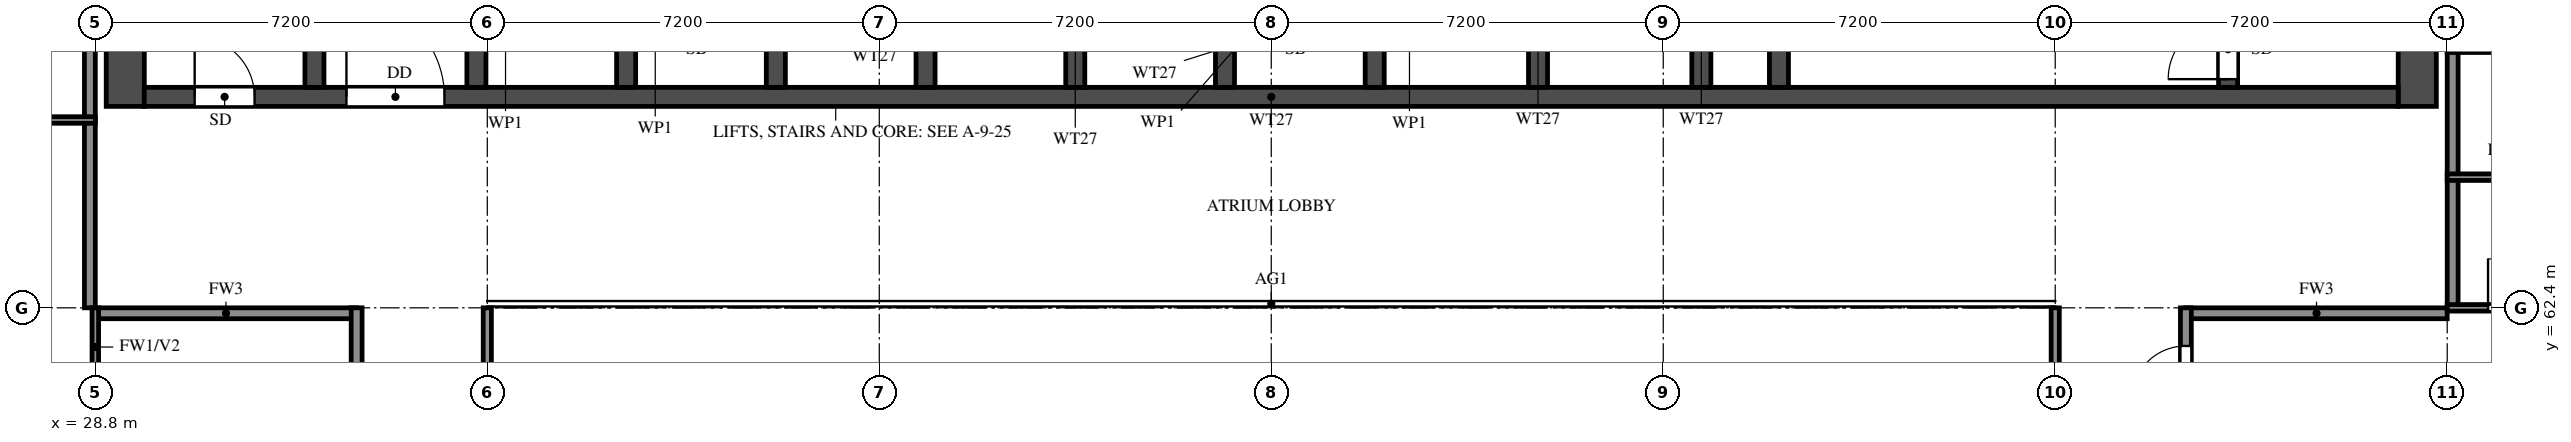
"""IFC4 building model, lengths in metres.
Left out: names, types, materials, properties, quantities, classifications, styles, units other than length and angle.
Written with IfcOpenShell. Run it as: python <this file> out.ifc"""

import sys

from ifc_helpers import new_model, si_unit, direction, frame, frame_2d, origin, place, context, subcontext, project, spatial, rectangle, extrude, element, fill, save


model = new_model("IFC4")
c1 = context("Model", 3, precision=1e-05, world=origin(), true_north=direction((0.0, 1.0)))
c2 = subcontext(c1, "Body", "Model", "MODEL_VIEW")
j1 = project(units=[si_unit("LENGTHUNIT", "METRE"), si_unit("PLANEANGLEUNIT", "RADIAN")], contexts=[c1])
p1 = place(None, origin())
s1 = spatial("IfcSite", under=j1, at=p1, CompositionType="ELEMENT")
p2 = place(p1, origin())
s2 = spatial("IfcBuilding", under=s1, at=p2, CompositionType="ELEMENT")
p3 = place(p2, frame((0.0, 0.0, 192.0)))
s3 = spatial("IfcBuildingStorey", under=s2, at=p3, CompositionType="ELEMENT", Elevation=192.0)
for number, where, z_axis, x_axis in (
    (1, (29.35, 66.1, 0.0), (0.0, 0.0, 1.0), (0.0, 1.0, 0.0)),
    (2, (71.45, 66.1, 0.0), (0.0, 0.0, 1.0), (0.0, 1.0, 0.0)),
):
    element("IfcWall", number, at=place(p3, frame(where, z_axis=z_axis, x_axis=x_axis)), inside=s3, PredefinedType="SHEAR", context=c2, shape_type="SweptSolid", body=[
        extrude(rectangle(XDim=11.9, YDim=0.7, at=frame_2d((5.95, 0.0))), origin(), (0.0, 0.0, 1.0), 3.2),
    ])
p4 = place(p3, frame((29.7, 66.275, 0.0), z_axis=(0.0, 0.0, 1.0), x_axis=(1.0, 0.0, 0.0)))
e3 = element("IfcWall", 3, at=p4, inside=s3, PredefinedType="SHEAR", context=c2, shape_type="SweptSolid", body=[
    extrude(rectangle(XDim=41.4, YDim=0.35, at=frame_2d((20.7, 0.0))), origin(), (0.0, 0.0, 1.0), 3.2),
])
p5 = place(p4, frame((0.925, 0.0, 0.0)))
e4 = element("IfcOpeningElement", 4, at=p5, cuts=e3, PredefinedType="OPENING", context=c2, shape_type="SweptSolid", body=[
    extrude(rectangle(XDim=1.1, YDim=2.1, at=frame_2d((0.55, 1.05))), frame((0.0, 0.185, 0.0), z_axis=(0.0, -1.0, 0.0), x_axis=(1.0, 0.0, 0.0)), (0.0, 0.0, 1.0), 0.37),
])
p6 = place(p4, frame((3.712, 0.0, 0.0)))
e5 = element("IfcOpeningElement", 5, at=p6, cuts=e3, PredefinedType="OPENING", context=c2, shape_type="SweptSolid", body=[
    extrude(rectangle(XDim=1.8, YDim=2.1, at=frame_2d((0.9, 1.05))), frame((0.0, 0.185, 0.0), z_axis=(0.0, -1.0, 0.0), x_axis=(1.0, 0.0, 0.0)), (0.0, 0.0, 1.0), 0.37),
])
p7 = place(p3, frame((32.825, 66.45, 0.0), z_axis=(0.0, 0.0, 1.0), x_axis=(0.0, 1.0, 0.0)))
e6 = element("IfcWall", 6, at=p7, inside=s3, PredefinedType="SHEAR", context=c2, shape_type="SweptSolid", body=[
    extrude(rectangle(XDim=10.85, YDim=0.35, at=frame_2d((5.425, 0.0))), origin(), (0.0, 0.0, 1.0), 3.2),
])
p8 = place(p3, frame((67.975, 66.45, 0.0), z_axis=(0.0, 0.0, 1.0), x_axis=(0.0, 1.0, 0.0)))
e7 = element("IfcWall", 7, at=p8, inside=s3, PredefinedType="SHEAR", context=c2, shape_type="SweptSolid", body=[
    extrude(rectangle(XDim=10.85, YDim=0.35, at=frame_2d((5.425, 0.0))), origin(), (0.0, 0.0, 1.0), 3.2),
])
p9 = place(p8, frame((0.15, 0.0, 0.0)))
e8 = element("IfcOpeningElement", 8, at=p9, cuts=e7, PredefinedType="OPENING", context=c2, shape_type="SweptSolid", body=[
    extrude(rectangle(XDim=1.1, YDim=2.1, at=frame_2d((0.55, 1.05))), frame((0.0, 0.185, 0.0), z_axis=(0.0, -1.0, 0.0), x_axis=(1.0, 0.0, 0.0)), (0.0, 0.0, 1.0), 0.37),
])
p10 = place(p3, frame((59.725, 66.45, 0.0), z_axis=(0.0, 0.0, 1.0), x_axis=(0.0, 1.0, 0.0)))
e9 = element("IfcWall", 9, at=p10, inside=s3, PredefinedType="SHEAR", context=c2, shape_type="SweptSolid", body=[
    extrude(rectangle(XDim=6.125, YDim=0.35, at=frame_2d((3.062, 0.0))), origin(), (0.0, 0.0, 1.0), 3.2),
])
p11 = place(p10, frame((3.85, 0.0, 0.0)))
e10 = element("IfcOpeningElement", 10, at=p11, cuts=e9, PredefinedType="OPENING", context=c2, shape_type="SweptSolid", body=[
    extrude(rectangle(XDim=1.2, YDim=2.1, at=frame_2d((0.6, 1.05))), frame((0.0, 0.185, 0.0), z_axis=(0.0, -1.0, 0.0), x_axis=(1.0, 0.0, 0.0)), (0.0, 0.0, 1.0), 0.37),
])
for number, where, z_axis, x_axis in (
    (11, (35.8, 66.45, 0.0), (0.0, 0.0, 1.0), (0.0, 1.0, 0.0)),
    (12, (38.55, 66.45, 0.0), (0.0, 0.0, 1.0), (0.0, 1.0, 0.0)),
    (13, (41.3, 66.45, 0.0), (0.0, 0.0, 1.0), (0.0, 1.0, 0.0)),
    (14, (44.05, 66.45, 0.0), (0.0, 0.0, 1.0), (0.0, 1.0, 0.0)),
    (15, (46.8, 66.45, 0.0), (0.0, 0.0, 1.0), (0.0, 1.0, 0.0)),
    (16, (49.55, 66.45, 0.0), (0.0, 0.0, 1.0), (0.0, 1.0, 0.0)),
    (17, (52.3, 66.45, 0.0), (0.0, 0.0, 1.0), (0.0, 1.0, 0.0)),
    (18, (55.3, 66.45, 0.0), (0.0, 0.0, 1.0), (0.0, 1.0, 0.0)),
    (19, (58.3, 66.45, 0.0), (0.0, 0.0, 1.0), (0.0, 1.0, 0.0)),
):
    element("IfcWall", number, at=place(p3, frame(where, z_axis=z_axis, x_axis=x_axis)), inside=s3, PredefinedType="SHEAR", context=c2, shape_type="SweptSolid", body=[
        extrude(rectangle(XDim=2.425, YDim=0.35, at=frame_2d((1.212, 0.0))), origin(), (0.0, 0.0, 1.0), 3.2),
    ])
for number, where, z_axis, x_axis in (
    (20, (28.8, 62.3, 0.0), (0.0, 0.0, 1.0), (1.0, 0.0, 0.0)),
    (21, (67.2, 62.3, 0.0), (0.0, 0.0, 1.0), (1.0, 0.0, 0.0)),
):
    element("IfcWall", number, at=place(p3, frame(where, z_axis=z_axis, x_axis=x_axis)), inside=s3, PredefinedType="SOLIDWALL", context=c2, shape_type="SweptSolid", body=[
        extrude(rectangle(XDim=4.8, YDim=0.2, at=frame_2d((2.4, 0.0))), origin(), (0.0, 0.0, 1.0), 3.2),
    ])
p12 = place(p3, frame((28.7, 62.4, 0.0), z_axis=(0.0, 0.0, 1.0), x_axis=(0.0, 1.0, 0.0)))
e22 = element("IfcWall", 22, at=p12, inside=s3, PredefinedType="SOLIDWALL", context=c2, shape_type="SweptSolid", body=[
    extrude(rectangle(XDim=15.6, YDim=0.2, at=frame_2d((7.8, 0.0))), origin(), (0.0, 0.0, 1.0), 3.2),
])
p13 = place(p3, frame((33.6, 56.4, 0.0), z_axis=(0.0, 0.0, 1.0), x_axis=(0.0, 1.0, 0.0)))
e23 = element("IfcWall", 23, at=p13, inside=s3, PredefinedType="SOLIDWALL", context=c2, shape_type="SweptSolid", body=[
    extrude(rectangle(XDim=6.0, YDim=0.2, at=frame_2d((3.0, 0.0))), origin(), (0.0, 0.0, 1.0), 3.2),
])
p14 = place(p13, frame((3.7, 0.0, 0.0)))
e24 = element("IfcOpeningElement", 24, at=p14, cuts=e23, PredefinedType="OPENING", context=c2, shape_type="SweptSolid", body=[
    extrude(rectangle(XDim=1.0, YDim=2.1, at=frame_2d((0.5, 1.05))), frame((0.0, 0.11, 0.0), z_axis=(0.0, -1.0, 0.0), x_axis=(1.0, 0.0, 0.0)), (0.0, 0.0, 1.0), 0.22),
])
p15 = place(p3, frame((67.2, 45.6, 0.0), z_axis=(0.0, 0.0, 1.0), x_axis=(0.0, 1.0, 0.0)))
e25 = element("IfcWall", 25, at=p15, inside=s3, PredefinedType="SOLIDWALL", context=c2, shape_type="SweptSolid", body=[
    extrude(rectangle(XDim=16.8, YDim=0.2, at=frame_2d((8.4, 0.0))), origin(), (0.0, 0.0, 1.0), 3.2),
])
p16 = place(p15, frame((8.3, 0.0, 0.0)))
e26 = element("IfcOpeningElement", 26, at=p16, cuts=e25, PredefinedType="OPENING", context=c2, shape_type="SweptSolid", body=[
    extrude(rectangle(XDim=1.0, YDim=2.1, at=frame_2d((0.5, 1.05))), frame((0.0, 0.11, 0.0), z_axis=(0.0, -1.0, 0.0), x_axis=(1.0, 0.0, 0.0)), (0.0, 0.0, 1.0), 0.22),
])
p17 = place(p15, frame((15.1, 0.0, 0.0)))
e27 = element("IfcOpeningElement", 27, at=p17, cuts=e25, PredefinedType="OPENING", context=c2, shape_type="SweptSolid", body=[
    extrude(rectangle(XDim=1.0, YDim=2.1, at=frame_2d((0.5, 1.05))), frame((0.0, 0.11, 0.0), z_axis=(0.0, -1.0, 0.0), x_axis=(1.0, 0.0, 0.0)), (0.0, 0.0, 1.0), 0.22),
])
p18 = place(p15, frame((0.7, 0.0, 0.0)))
e28 = element("IfcOpeningElement", 28, at=p18, cuts=e25, PredefinedType="OPENING", context=c2, shape_type="SweptSolid", body=[
    extrude(rectangle(XDim=1.0, YDim=2.1, at=frame_2d((0.5, 1.05))), frame((0.0, 0.11, 0.0), z_axis=(0.0, -1.0, 0.0), x_axis=(1.0, 0.0, 0.0)), (0.0, 0.0, 1.0), 0.22),
])
p19 = place(p3, frame((72.1, 62.4, 0.0), z_axis=(0.0, 0.0, 1.0), x_axis=(0.0, 1.0, 0.0)))
e29 = element("IfcWall", 29, at=p19, inside=s3, PredefinedType="SOLIDWALL", context=c2, shape_type="SweptSolid", body=[
    extrude(rectangle(XDim=15.6, YDim=0.2, at=frame_2d((7.8, 0.0))), origin(), (0.0, 0.0, 1.0), 3.2),
])
p20 = place(p3, frame((72.0, 62.4, 0.0), z_axis=(0.0, 0.0, 1.0), x_axis=(1.0, 0.0, 0.0)))
e30 = element("IfcWall", 30, at=p20, inside=s3, PredefinedType="PARTITIONING", context=c2, shape_type="SweptSolid", body=[
    extrude(rectangle(XDim=2.4, YDim=0.12, at=frame_2d((1.2, 0.0))), origin(), (0.0, 0.0, 1.0), 3.2),
])
p21 = place(p20, frame((0.75, 0.0, 0.0)))
e31 = element("IfcOpeningElement", 31, at=p21, cuts=e30, PredefinedType="OPENING", context=c2, shape_type="SweptSolid", body=[
    extrude(rectangle(XDim=0.9, YDim=2.1, at=frame_2d((0.45, 1.05))), frame((0.0, 0.07, 0.0), z_axis=(0.0, -1.0, 0.0), x_axis=(1.0, 0.0, 0.0)), (0.0, 0.0, 1.0), 0.14),
])
p22 = place(p3, frame((72.0, 64.8, 0.0), z_axis=(0.0, 0.0, 1.0), x_axis=(1.0, 0.0, 0.0)))
e32 = element("IfcWall", 32, at=p22, inside=s3, PredefinedType="PARTITIONING", context=c2, shape_type="SweptSolid", body=[
    extrude(rectangle(XDim=5.1, YDim=0.12, at=frame_2d((2.55, 0.0))), origin(), (0.0, 0.0, 1.0), 3.2),
])
p23 = place(p22, frame((2.15, 0.0, 0.0)))
e33 = element("IfcOpeningElement", 33, at=p23, cuts=e32, PredefinedType="OPENING", context=c2, shape_type="SweptSolid", body=[
    extrude(rectangle(XDim=0.8, YDim=2.1, at=frame_2d((0.4, 1.05))), frame((0.0, 0.07, 0.0), z_axis=(0.0, -1.0, 0.0), x_axis=(1.0, 0.0, 0.0)), (0.0, 0.0, 1.0), 0.14),
])
for number, where, z_axis, x_axis in (
    (34, (23.7, 65.85, 0.0), (0.0, 0.0, 1.0), (1.0, 0.0, 0.0)),
    (35, (72.0, 67.15, 0.0), (0.0, 0.0, 1.0), (1.0, 0.0, 0.0)),
):
    element("IfcWall", number, at=place(p3, frame(where, z_axis=z_axis, x_axis=x_axis)), inside=s3, PredefinedType="PARTITIONING", context=c2, shape_type="SweptSolid", body=[
        extrude(rectangle(XDim=5.1, YDim=0.12, at=frame_2d((2.55, 0.0))), origin(), (0.0, 0.0, 1.0), 3.2),
    ])
p24 = place(p3, frame((28.8, 58.8, 0.0), z_axis=(0.0, 0.0, 1.0), x_axis=(0.0, 1.0, 0.0)))
e36 = element("IfcWall", 36, at=p24, inside=s3, PredefinedType="PARTITIONING", context=c2, shape_type="SweptSolid", body=[
    extrude(rectangle(XDim=3.6, YDim=0.12, at=frame_2d((1.8, 0.0))), origin(), (0.0, 0.0, 1.0), 3.2),
])
p25 = place(p24, frame((0.75, 0.0, 0.0)))
e37 = element("IfcOpeningElement", 37, at=p25, cuts=e36, PredefinedType="OPENING", context=c2, shape_type="SweptSolid", body=[
    extrude(rectangle(XDim=0.9, YDim=2.1, at=frame_2d((0.45, 1.05))), frame((0.0, 0.07, 0.0), z_axis=(0.0, -1.0, 0.0), x_axis=(1.0, 0.0, 0.0)), (0.0, 0.0, 1.0), 0.14),
])
for number, where, z_axis, x_axis in (
    (38, (36.0, 48.0, 0.0), (0.0, 0.0, 1.0), (0.0, 1.0, 0.0)),
    (39, (64.8, 48.0, 0.0), (0.0, 0.0, 1.0), (0.0, 1.0, 0.0)),
):
    element("IfcWall", number, at=place(p3, frame(where, z_axis=z_axis, x_axis=x_axis)), inside=s3, PredefinedType="SOLIDWALL", context=c2, shape_type="SweptSolid", body=[
        extrude(rectangle(XDim=14.4, YDim=0.15, at=frame_2d((7.2, 0.0))), origin(), (0.0, 0.0, 1.0), 2.3),
    ])
p26 = place(p5, origin())
e40 = element("IfcDoor", 40, at=p26, inside=s3, OperationType="SINGLE_SWING_LEFT", PredefinedType="DOOR", context=c2, shape_type="SweptSolid", body=[
    extrude(rectangle(XDim=1.1, YDim=2.1, at=frame_2d((0.55, 1.05))), frame((0.0, 0.025, 0.0), z_axis=(0.0, -1.0, 0.0), x_axis=(1.0, 0.0, 0.0)), (0.0, 0.0, 1.0), 0.05),
])
fill(e4, e40)
p27 = place(p9, origin())
e41 = element("IfcDoor", 41, at=p27, inside=s3, OperationType="SINGLE_SWING_LEFT", PredefinedType="DOOR", context=c2, shape_type="SweptSolid", body=[
    extrude(rectangle(XDim=1.1, YDim=2.1, at=frame_2d((0.55, 1.05))), frame((0.0, 0.025, 0.0), z_axis=(0.0, -1.0, 0.0), x_axis=(1.0, 0.0, 0.0)), (0.0, 0.0, 1.0), 0.05),
])
fill(e8, e41)
p28 = place(p6, origin())
e42 = element("IfcDoor", 42, at=p28, inside=s3, OperationType="DOUBLE_DOOR_SINGLE_SWING", PredefinedType="DOOR", context=c2, shape_type="SweptSolid", body=[
    extrude(rectangle(XDim=1.8, YDim=2.1, at=frame_2d((0.9, 1.05))), frame((0.0, 0.025, 0.0), z_axis=(0.0, -1.0, 0.0), x_axis=(1.0, 0.0, 0.0)), (0.0, 0.0, 1.0), 0.05),
])
fill(e5, e42)
p29 = place(p21, origin())
e43 = element("IfcDoor", 43, at=p29, inside=s3, OperationType="SINGLE_SWING_RIGHT", PredefinedType="DOOR", context=c2, shape_type="SweptSolid", body=[
    extrude(rectangle(XDim=0.9, YDim=2.1, at=frame_2d((0.45, 1.05))), frame((0.0, 0.025, 0.0), z_axis=(0.0, -1.0, 0.0), x_axis=(1.0, 0.0, 0.0)), (0.0, 0.0, 1.0), 0.05),
])
fill(e31, e43)
p30 = place(p17, origin())
e44 = element("IfcDoor", 44, at=p30, inside=s3, OperationType="SINGLE_SWING_LEFT", PredefinedType="DOOR", context=c2, shape_type="SweptSolid", body=[
    extrude(rectangle(XDim=1.0, YDim=2.1, at=frame_2d((0.5, 1.05))), frame((0.0, 0.025, 0.0), z_axis=(0.0, -1.0, 0.0), x_axis=(1.0, 0.0, 0.0)), (0.0, 0.0, 1.0), 0.05),
])
fill(e27, e44)
save(model, sys.argv[1])
